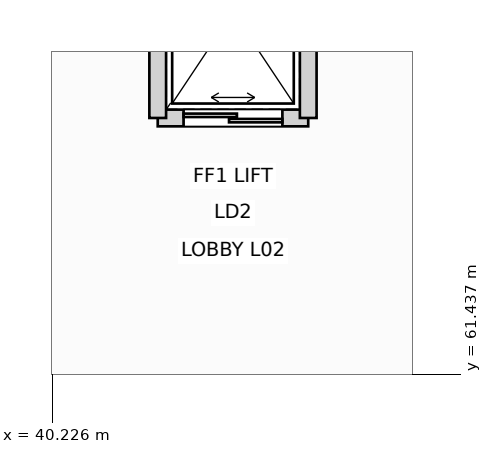
"""IFC4 building model, lengths in metres.
Left out: names, types, materials, properties, quantities, classifications, styles, units other than length and angle.
Written with IfcOpenShell. Run it as: python <this file> out.ifc"""

import sys

from ifc_helpers import new_model, si_unit, direction, frame, frame_2d, origin, place, context, subcontext, project, spatial, rectangle, extrude, element, fill, save


model = new_model("IFC4")
c1 = context("Model", 3, precision=1e-05, world=origin(), true_north=direction((0.0, 1.0)))
c2 = subcontext(c1, "Body", "Model", "MODEL_VIEW")
j1 = project(units=[si_unit("LENGTHUNIT", "METRE"), si_unit("PLANEANGLEUNIT", "RADIAN")], contexts=[c1])
p1 = place(None, origin())
s1 = spatial("IfcSite", under=j1, at=p1, CompositionType="ELEMENT")
p2 = place(p1, origin())
s2 = spatial("IfcBuilding", under=s1, at=p2, CompositionType="ELEMENT")
p3 = place(p2, frame((0.0, 0.0, 11.4)))
s3 = spatial("IfcBuildingStorey", under=s2, at=p3, CompositionType="ELEMENT", Elevation=11.4)
p4 = place(p3, frame((41.61, 64.81, 0.0), z_axis=(0.0, 0.0, 1.0), x_axis=(1.0, 0.0, 0.0)))
e1 = element("IfcWall", 1, at=p4, inside=s3, PredefinedType="PARTITIONING", context=c2, shape_type="SweptSolid", body=[
    extrude(rectangle(XDim=1.98, YDim=0.22, at=frame_2d((0.99, 0.0))), origin(), (0.0, 0.0, 1.0), 5.085),
])
p5 = place(p4, frame((0.34, 0.0, 0.0)))
e2 = element("IfcOpeningElement", 2, at=p5, cuts=e1, PredefinedType="OPENING", context=c2, shape_type="SweptSolid", body=[
    extrude(rectangle(XDim=1.3, YDim=2.2, at=frame_2d((0.65, 1.1))), frame((0.0, 0.12, 0.0), z_axis=(0.0, -1.0, 0.0), x_axis=(1.0, 0.0, 0.0)), (0.0, 0.0, 1.0), 0.24),
])
for number, where, z_axis, x_axis in (
    (3, (41.61, 64.81, 0.0), (0.0, 0.0, 1.0), (0.0, 1.0, 0.0)),
    (4, (43.59, 64.81, 0.0), (0.0, 0.0, 1.0), (0.0, 1.0, 0.0)),
):
    element("IfcWall", number, at=place(p3, frame(where, z_axis=z_axis, x_axis=x_axis)), inside=s3, PredefinedType="PARTITIONING", context=c2, shape_type="SweptSolid", body=[
        extrude(rectangle(XDim=2.78, YDim=0.22, at=frame_2d((1.39, 0.0))), origin(), (0.0, 0.0, 1.0), 4.845),
    ])
p6 = place(p5, origin())
e5 = element("IfcDoor", 5, at=p6, inside=s3, OperationType="DOUBLE_DOOR_SLIDING", PredefinedType="DOOR", context=c2, shape_type="SweptSolid", body=[
    extrude(rectangle(XDim=1.3, YDim=2.2, at=frame_2d((0.65, 1.1))), frame((0.0, 0.025, 0.0), z_axis=(0.0, -1.0, 0.0), x_axis=(1.0, 0.0, 0.0)), (0.0, 0.0, 1.0), 0.05),
])
fill(e2, e5)
save(model, sys.argv[1])
